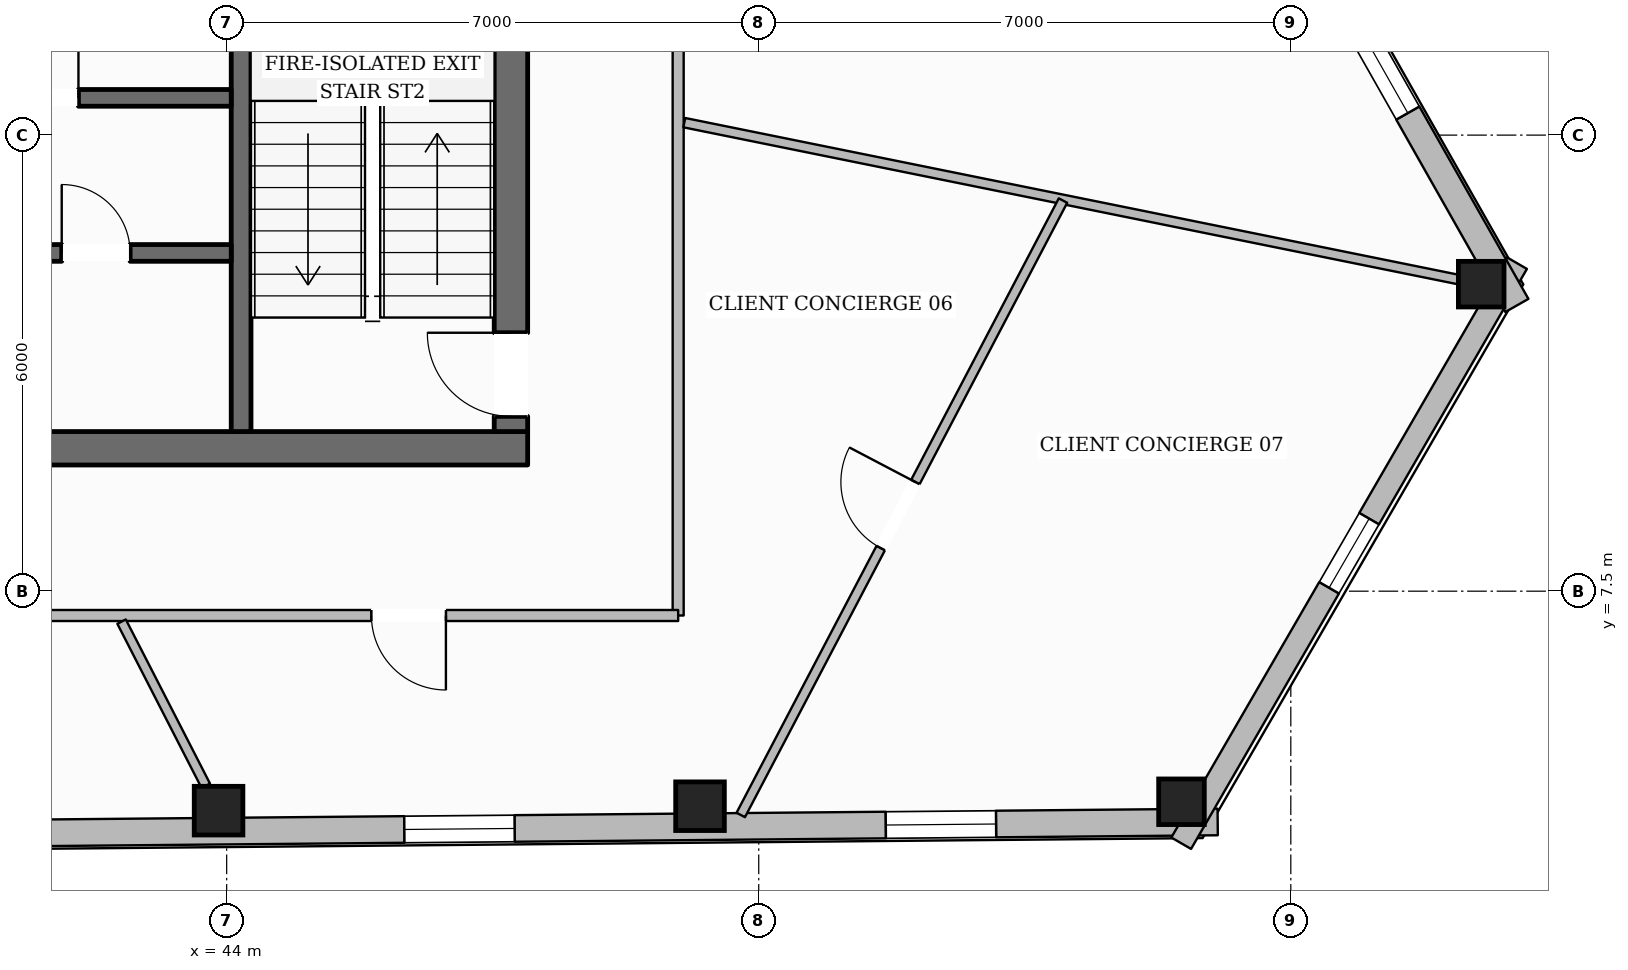
"""IFC4 building model, lengths in metres.
Left out: names, types, materials, properties, quantities, classifications, styles, units other than length and angle.
Written with IfcOpenShell. Run it as: python <this file> out.ifc"""

import sys

from ifc_helpers import new_model, si_unit, direction, frame, frame_2d, origin, origin_2d, place, context, subcontext, project, spatial, rectangle, hollow_rectangle, extrude, element, fill, save


model = new_model("IFC4")
c1 = context("Model", 3, precision=1e-05, world=origin(), true_north=direction((0.0, 1.0)))
c2 = subcontext(c1, "Body", "Model", "MODEL_VIEW")
j1 = project(units=[si_unit("LENGTHUNIT", "METRE"), si_unit("PLANEANGLEUNIT", "RADIAN")], contexts=[c1])
p1 = place(None, origin())
s1 = spatial("IfcSite", under=j1, at=p1, CompositionType="ELEMENT")
p2 = place(p1, origin())
s2 = spatial("IfcBuilding", under=s1, at=p2, CompositionType="ELEMENT")
p3 = place(p2, frame((0.0, 0.0, 222.75)))
s3 = spatial("IfcBuildingStorey", under=s2, at=p3, CompositionType="ELEMENT", Elevation=222.75)
p4 = place(p3, frame((28.04, 9.38, 0.0), z_axis=(0.0, 0.0, 1.0), x_axis=(1.0, 0.0, 0.0)))
e1 = element("IfcWall", 1, at=p4, inside=s3, PredefinedType="SOLIDWALL", context=c2, shape_type="SweptSolid", body=[
    extrude(rectangle(XDim=19.92, YDim=0.44, at=frame_2d((9.96, 0.0))), origin(), (0.0, 0.0, 1.0), 3.6),
])
p5 = place(p4, frame((10.46, 0.0, 0.0)))
e2 = element("IfcOpeningElement", 2, at=p5, cuts=e1, PredefinedType="OPENING", context=c2, shape_type="SweptSolid", body=[
    extrude(rectangle(XDim=1.4, YDim=2.2, at=frame_2d((0.7, 1.1))), frame((0.0, 0.23, 0.0), z_axis=(0.0, -1.0, 0.0), x_axis=(1.0, 0.0, 0.0)), (0.0, 0.0, 1.0), 0.46),
])
p6 = place(p3, frame((47.74, 9.6, 0.0), z_axis=(0.0, 0.0, 1.0), x_axis=(0.0, 1.0, 0.0)))
e3 = element("IfcWall", 3, at=p6, inside=s3, PredefinedType="SOLIDWALL", context=c2, shape_type="SweptSolid", body=[
    extrude(rectangle(XDim=13.0, YDim=0.44, at=frame_2d((6.5, 0.0))), origin(), (0.0, 0.0, 1.0), 3.6),
])
p7 = place(p6, frame((0.2, 0.0, 0.0)))
e4 = element("IfcOpeningElement", 4, at=p7, cuts=e3, PredefinedType="OPENING", context=c2, shape_type="SweptSolid", body=[
    extrude(rectangle(XDim=1.1, YDim=2.15, at=frame_2d((0.55, 1.075))), frame((0.0, 0.23, 0.0), z_axis=(0.0, -1.0, 0.0), x_axis=(1.0, 0.0, 0.0)), (0.0, 0.0, 1.0), 0.46),
])
p8 = place(p6, frame((8.4, 0.0, 0.0)))
e5 = element("IfcOpeningElement", 5, at=p8, cuts=e3, PredefinedType="OPENING", context=c2, shape_type="SweptSolid", body=[
    extrude(rectangle(XDim=0.9, YDim=2.1, at=frame_2d((0.45, 1.05))), frame((0.0, 0.23, 0.0), z_axis=(0.0, -1.0, 0.0), x_axis=(1.0, 0.0, 0.0)), (0.0, 0.0, 1.0), 0.46),
])
p9 = place(p3, frame((44.19, 9.6, 0.0), z_axis=(0.0, 0.0, 1.0), x_axis=(0.0, 1.0, 0.0)))
e6 = element("IfcWall", 6, at=p9, inside=s3, PredefinedType="SHEAR", context=c2, shape_type="SweptSolid", body=[
    extrude(rectangle(XDim=13.0, YDim=0.26, at=frame_2d((6.5, 0.0))), origin(), (0.0, 0.0, 1.0), 3.6),
])
p10 = place(p9, frame((10.925, 0.0, 0.0)))
e7 = element("IfcOpeningElement", 7, at=p10, cuts=e6, PredefinedType="OPENING", context=c2, shape_type="SweptSolid", body=[
    extrude(rectangle(XDim=1.25, YDim=2.25, at=frame_2d((0.625, 1.125))), frame((0.0, 0.14, 0.0), z_axis=(0.0, -1.0, 0.0), x_axis=(1.0, 0.0, 0.0)), (0.0, 0.0, 1.0), 0.28),
])
p11 = place(p3, frame((31.94, 13.99, 0.0), z_axis=(0.0, 0.0, 1.0), x_axis=(1.0, 0.0, 0.0)))
e8 = element("IfcWall", 8, at=p11, inside=s3, PredefinedType="SOLIDWALL", context=c2, shape_type="SweptSolid", body=[
    extrude(rectangle(XDim=12.12, YDim=0.22, at=frame_2d((6.06, 0.0))), origin(), (0.0, 0.0, 1.0), 3.6),
])
p12 = place(p11, frame((3.11, 0.0, 0.0)))
e9 = element("IfcOpeningElement", 9, at=p12, cuts=e8, PredefinedType="OPENING", context=c2, shape_type="SweptSolid", body=[
    extrude(rectangle(XDim=0.9, YDim=2.1, at=frame_2d((0.45, 1.05))), frame((0.0, 0.12, 0.0), z_axis=(0.0, -1.0, 0.0), x_axis=(1.0, 0.0, 0.0)), (0.0, 0.0, 1.0), 0.24),
])
p13 = place(p11, frame((9.21, 0.0, 0.0)))
e10 = element("IfcOpeningElement", 10, at=p13, cuts=e8, PredefinedType="OPENING", context=c2, shape_type="SweptSolid", body=[
    extrude(rectangle(XDim=0.9, YDim=2.1, at=frame_2d((0.45, 1.05))), frame((0.0, 0.12, 0.0), z_axis=(0.0, -1.0, 0.0), x_axis=(1.0, 0.0, 0.0)), (0.0, 0.0, 1.0), 0.24),
])
p14 = place(p3, frame((40.28, 11.95, 0.0), z_axis=(0.0, 0.0, 1.0), x_axis=(1.0, 0.0, 0.0)))
e11 = element("IfcWall", 11, at=p14, inside=s3, PredefinedType="SOLIDWALL", context=c2, shape_type="SweptSolid", body=[
    extrude(rectangle(XDim=3.78, YDim=0.22, at=frame_2d((1.89, 0.0))), origin(), (0.0, 0.0, 1.0), 3.6),
])
p15 = place(p14, frame((1.55, 0.0, 0.0)))
e12 = element("IfcOpeningElement", 12, at=p15, cuts=e11, PredefinedType="OPENING", context=c2, shape_type="SweptSolid", body=[
    extrude(rectangle(XDim=0.9, YDim=2.1, at=frame_2d((0.45, 1.05))), frame((0.0, 0.12, 0.0), z_axis=(0.0, -1.0, 0.0), x_axis=(1.0, 0.0, 0.0)), (0.0, 0.0, 1.0), 0.24),
])
for number, where, z_axis, x_axis in (
    (13, (43.893, 4.613, 0.0), (0.0, 0.0, 1.0), (1.0, 0.0, 0.0)),
    (14, (50.228, 4.671, 0.0), (0.0, 0.0, 1.0), (1.0, 0.0, 0.0)),
):
    element("IfcColumn", number, at=place(p3, frame(where, z_axis=z_axis, x_axis=x_axis)), inside=s3, PredefinedType="COLUMN", context=c2, shape_type="SweptSolid", body=[
        extrude(hollow_rectangle(XDim=0.64, YDim=0.64, WallThickness=0.028, at=origin_2d()), origin(), (0.0, 0.0, 1.0), 3.6),
    ])
for number, where, z_axis, x_axis in (
    (15, (56.562, 4.729, 0.0), (0.0, 0.0, 1.0), (1.0, 0.0, 0.0)),
    (16, (60.505, 11.539, 0.0), (0.0, 0.0, 1.0), (1.0, 0.0, 0.0)),
):
    element("IfcColumn", number, at=place(p3, frame(where, z_axis=z_axis, x_axis=x_axis)), inside=s3, PredefinedType="COLUMN", context=c2, shape_type="SweptSolid", body=[
        extrude(hollow_rectangle(XDim=0.6, YDim=0.6, WallThickness=0.028, at=origin_2d()), origin(), (0.0, 0.0, 1.0), 3.6),
    ])
p16 = place(p3, frame((57.038, 4.464, 0.0), z_axis=(0.0, 0.0, 1.0), x_axis=(-0.999957405044, -0.009229739812, 0.0)))
e17 = element("IfcWall", 17, at=p16, inside=s3, PredefinedType="STANDARD", context=c2, shape_type="SweptSolid", body=[
    extrude(rectangle(XDim=38.963, YDim=0.35, at=frame_2d((19.481, 0.0))), origin(), (0.0, 0.0, 1.0), 3.132),
])
p17 = place(p16, frame((34.588, 0.0, 0.65)))
e18 = element("IfcOpeningElement", 18, at=p17, cuts=e17, PredefinedType="OPENING", context=c2, shape_type="SweptSolid", body=[
    extrude(rectangle(XDim=1.45, YDim=1.75, at=frame_2d((0.725, 0.875))), frame((0.0, 0.185, 0.0), z_axis=(0.0, -1.0, 0.0), x_axis=(1.0, 0.0, 0.0)), (0.0, 0.0, 1.0), 0.37),
])
p18 = place(p16, frame((28.254, 0.0, 0.65)))
e19 = element("IfcOpeningElement", 19, at=p18, cuts=e17, PredefinedType="OPENING", context=c2, shape_type="SweptSolid", body=[
    extrude(rectangle(XDim=1.45, YDim=1.75, at=frame_2d((0.725, 0.875))), frame((0.0, 0.185, 0.0), z_axis=(0.0, -1.0, 0.0), x_axis=(1.0, 0.0, 0.0)), (0.0, 0.0, 1.0), 0.37),
])
p19 = place(p16, frame((21.919, 0.0, 0.65)))
e20 = element("IfcOpeningElement", 20, at=p19, cuts=e17, PredefinedType="OPENING", context=c2, shape_type="SweptSolid", body=[
    extrude(rectangle(XDim=1.45, YDim=1.75, at=frame_2d((0.725, 0.875))), frame((0.0, 0.185, 0.0), z_axis=(0.0, -1.0, 0.0), x_axis=(1.0, 0.0, 0.0)), (0.0, 0.0, 1.0), 0.37),
])
p20 = place(p16, frame((9.25, 0.0, 0.65)))
e21 = element("IfcOpeningElement", 21, at=p20, cuts=e17, PredefinedType="OPENING", context=c2, shape_type="SweptSolid", body=[
    extrude(rectangle(XDim=1.45, YDim=1.75, at=frame_2d((0.725, 0.875))), frame((0.0, 0.185, 0.0), z_axis=(0.0, -1.0, 0.0), x_axis=(1.0, 0.0, 0.0)), (0.0, 0.0, 1.0), 0.37),
])
p21 = place(p16, frame((2.916, 0.0, 0.65)))
e22 = element("IfcOpeningElement", 22, at=p21, cuts=e17, PredefinedType="OPENING", context=c2, shape_type="SweptSolid", body=[
    extrude(rectangle(XDim=1.45, YDim=1.75, at=frame_2d((0.725, 0.875))), frame((0.0, 0.185, 0.0), z_axis=(0.0, -1.0, 0.0), x_axis=(1.0, 0.0, 0.0)), (0.0, 0.0, 1.0), 0.37),
])
p22 = place(p3, frame((60.977, 11.815, 0.0), z_axis=(0.0, 0.0, 1.0), x_axis=(-0.501119216376, -0.865378258901, 0.0)))
e23 = element("IfcWall", 23, at=p22, inside=s3, PredefinedType="STANDARD", context=c2, shape_type="SweptSolid", body=[
    extrude(rectangle(XDim=8.818, YDim=0.3, at=frame_2d((4.409, 0.0))), origin(), (0.0, 0.0, 1.0), 3.132),
])
p23 = place(p22, frame((3.884, 0.0, 0.65)))
e24 = element("IfcOpeningElement", 24, at=p23, cuts=e23, PredefinedType="OPENING", context=c2, shape_type="SweptSolid", body=[
    extrude(rectangle(XDim=1.05, YDim=1.7, at=frame_2d((0.525, 0.85))), frame((0.0, 0.16, 0.0), z_axis=(0.0, -1.0, 0.0), x_axis=(1.0, 0.0, 0.0)), (0.0, 0.0, 1.0), 0.32),
])
p24 = place(p3, frame((41.804, 45.08, 0.0), z_axis=(0.0, 0.0, 1.0), x_axis=(0.493108750239, -0.869967677812, 0.0)))
e25 = element("IfcWall", 25, at=p24, inside=s3, PredefinedType="STANDARD", context=c2, shape_type="SweptSolid", body=[
    extrude(rectangle(XDim=38.876, YDim=0.35, at=frame_2d((19.438, 0.0))), origin(), (0.0, 0.0, 1.0), 3.132),
])
p25 = place(p24, frame((28.557, 0.0, 0.0)))
e26 = element("IfcOpeningElement", 26, at=p25, cuts=e25, PredefinedType="OPENING", context=c2, shape_type="SweptSolid", body=[
    extrude(rectangle(XDim=1.0, YDim=2.2, at=frame_2d((0.5, 1.1))), frame((0.0, 0.185, 0.0), z_axis=(0.0, -1.0, 0.0), x_axis=(1.0, 0.0, 0.0)), (0.0, 0.0, 1.0), 0.37),
])
p26 = place(p24, frame((34.516, 0.0, 0.65)))
e27 = element("IfcOpeningElement", 27, at=p26, cuts=e25, PredefinedType="OPENING", context=c2, shape_type="SweptSolid", body=[
    extrude(rectangle(XDim=1.45, YDim=1.75, at=frame_2d((0.725, 0.875))), frame((0.0, 0.185, 0.0), z_axis=(0.0, -1.0, 0.0), x_axis=(1.0, 0.0, 0.0)), (0.0, 0.0, 1.0), 0.37),
])
p27 = place(p24, frame((21.876, 0.0, 0.65)))
e28 = element("IfcOpeningElement", 28, at=p27, cuts=e25, PredefinedType="OPENING", context=c2, shape_type="SweptSolid", body=[
    extrude(rectangle(XDim=1.45, YDim=1.75, at=frame_2d((0.725, 0.875))), frame((0.0, 0.185, 0.0), z_axis=(0.0, -1.0, 0.0), x_axis=(1.0, 0.0, 0.0)), (0.0, 0.0, 1.0), 0.37),
])
p28 = place(p24, frame((9.237, 0.0, 0.65)))
e29 = element("IfcOpeningElement", 29, at=p28, cuts=e25, PredefinedType="OPENING", context=c2, shape_type="SweptSolid", body=[
    extrude(rectangle(XDim=1.45, YDim=1.75, at=frame_2d((0.725, 0.875))), frame((0.0, 0.185, 0.0), z_axis=(0.0, -1.0, 0.0), x_axis=(1.0, 0.0, 0.0)), (0.0, 0.0, 1.0), 0.37),
])
p29 = place(p24, frame((2.917, 0.0, 0.65)))
e30 = element("IfcOpeningElement", 30, at=p29, cuts=e25, PredefinedType="OPENING", context=c2, shape_type="SweptSolid", body=[
    extrude(rectangle(XDim=1.45, YDim=1.75, at=frame_2d((0.725, 0.875))), frame((0.0, 0.185, 0.0), z_axis=(0.0, -1.0, 0.0), x_axis=(1.0, 0.0, 0.0)), (0.0, 0.0, 1.0), 0.37),
])
p30 = place(p3, frame((49.94, 15.1, 0.0), z_axis=(0.0, 0.0, 1.0), x_axis=(0.0, -1.0, 0.0)))
e31 = element("IfcWall", 31, at=p30, inside=s3, PredefinedType="PARTITIONING", context=c2, shape_type="SweptSolid", body=[
    extrude(rectangle(XDim=7.92, YDim=0.145, at=frame_2d((3.96, 0.0))), origin(), (0.0, 0.0, 1.0), 3.6),
])
p31 = place(p3, frame((49.94, 7.18, 0.0), z_axis=(0.0, 0.0, 1.0), x_axis=(-1.0, 0.0, 0.0)))
e32 = element("IfcWall", 32, at=p31, inside=s3, PredefinedType="PARTITIONING", context=c2, shape_type="SweptSolid", body=[
    extrude(rectangle(XDim=23.88, YDim=0.145, at=frame_2d((11.94, 0.0))), origin(), (0.0, 0.0, 1.0), 3.339),
])
p32 = place(p31, frame((14.157, 0.0, 0.0)))
e33 = element("IfcOpeningElement", 33, at=p32, cuts=e32, PredefinedType="OPENING", context=c2, shape_type="SweptSolid", body=[
    extrude(rectangle(XDim=0.98, YDim=2.15, at=frame_2d((0.49, 1.075))), frame((0.0, 0.083, 0.0), z_axis=(0.0, -1.0, 0.0), x_axis=(1.0, 0.0, 0.0)), (0.0, 0.0, 1.0), 0.165),
])
p33 = place(p31, frame((3.056, 0.0, 0.0)))
e34 = element("IfcOpeningElement", 34, at=p33, cuts=e32, PredefinedType="OPENING", context=c2, shape_type="SweptSolid", body=[
    extrude(rectangle(XDim=0.98, YDim=2.15, at=frame_2d((0.49, 1.075))), frame((0.0, 0.083, 0.0), z_axis=(0.0, -1.0, 0.0), x_axis=(1.0, 0.0, 0.0)), (0.0, 0.0, 1.0), 0.165),
])
p34 = place(p3, frame((42.617, 7.1, 0.0), z_axis=(0.0, 0.0, 1.0), x_axis=(0.456486180098, -0.889730502669, 0.0)))
e35 = element("IfcWall", 35, at=p34, inside=s3, PredefinedType="PARTITIONING", context=c2, shape_type="SweptSolid", body=[
    extrude(rectangle(XDim=2.427, YDim=0.125, at=frame_2d((1.213, 0.0))), origin(), (0.0, 0.0, 1.0), 3.6),
])
p35 = place(p3, frame((50.021, 13.664, 0.0), z_axis=(0.0, 0.0, 1.0), x_axis=(0.980078307182, -0.198611459366, 0.0)))
e36 = element("IfcWall", 36, at=p35, inside=s3, PredefinedType="PARTITIONING", context=c2, shape_type="SweptSolid", body=[
    extrude(rectangle(XDim=10.383, YDim=0.125, at=frame_2d((5.192, 0.0))), origin(), (0.0, 0.0, 1.0), 3.141),
])
p36 = place(p3, frame((50.763, 4.556, 0.0), z_axis=(0.0, 0.0, 1.0), x_axis=(0.464483684419, 0.885581677153, 0.0)))
e37 = element("IfcWall", 37, at=p36, inside=s3, PredefinedType="PARTITIONING", context=c2, shape_type="SweptSolid", body=[
    extrude(rectangle(XDim=9.127, YDim=0.125, at=frame_2d((4.564, 0.0))), origin(), (0.0, 0.0, 1.0), 3.339),
])
p37 = place(p36, frame((3.966, 0.0, 0.0)))
e38 = element("IfcOpeningElement", 38, at=p37, cuts=e37, PredefinedType="OPENING", context=c2, shape_type="SweptSolid", body=[
    extrude(rectangle(XDim=0.98, YDim=2.15, at=frame_2d((0.49, 1.075))), frame((0.0, 0.073, 0.0), z_axis=(0.0, -1.0, 0.0), x_axis=(1.0, 0.0, 0.0)), (0.0, 0.0, 1.0), 0.145),
])
p38 = place(p20, origin())
e39 = element("IfcWindow", 39, at=p38, inside=s3, PartitioningType="SINGLE_PANEL", PredefinedType="WINDOW", context=c2, shape_type="SweptSolid", body=[
    extrude(rectangle(XDim=1.45, YDim=1.75, at=frame_2d((0.725, 0.875))), frame((0.0, 0.03, 0.0), z_axis=(0.0, -1.0, 0.0), x_axis=(1.0, 0.0, 0.0)), (0.0, 0.0, 1.0), 0.06),
])
fill(e21, e39)
p39 = place(p21, origin())
e40 = element("IfcWindow", 40, at=p39, inside=s3, PartitioningType="SINGLE_PANEL", PredefinedType="WINDOW", context=c2, shape_type="SweptSolid", body=[
    extrude(rectangle(XDim=1.45, YDim=1.75, at=frame_2d((0.725, 0.875))), frame((0.0, 0.03, 0.0), z_axis=(0.0, -1.0, 0.0), x_axis=(1.0, 0.0, 0.0)), (0.0, 0.0, 1.0), 0.06),
])
fill(e22, e40)
p40 = place(p26, origin())
e41 = element("IfcWindow", 41, at=p40, inside=s3, PartitioningType="SINGLE_PANEL", PredefinedType="WINDOW", context=c2, shape_type="SweptSolid", body=[
    extrude(rectangle(XDim=1.45, YDim=1.75, at=frame_2d((0.725, 0.875))), frame((0.0, 0.03, 0.0), z_axis=(0.0, -1.0, 0.0), x_axis=(1.0, 0.0, 0.0)), (0.0, 0.0, 1.0), 0.06),
])
fill(e27, e41)
p41 = place(p23, origin())
e42 = element("IfcWindow", 42, at=p41, inside=s3, PartitioningType="SINGLE_PANEL", PredefinedType="WINDOW", context=c2, shape_type="SweptSolid", body=[
    extrude(rectangle(XDim=1.05, YDim=1.7, at=frame_2d((0.525, 0.85))), frame((0.0, 0.03, 0.0), z_axis=(0.0, -1.0, 0.0), x_axis=(1.0, 0.0, 0.0)), (0.0, 0.0, 1.0), 0.06),
])
fill(e24, e42)
p42 = place(p7, origin())
e43 = element("IfcDoor", 43, at=p42, inside=s3, OperationType="SINGLE_SWING_RIGHT", PredefinedType="DOOR", context=c2, shape_type="SweptSolid", body=[
    extrude(rectangle(XDim=1.1, YDim=2.15, at=frame_2d((0.55, 1.075))), frame((0.0, 0.025, 0.0), z_axis=(0.0, -1.0, 0.0), x_axis=(1.0, 0.0, 0.0)), (0.0, 0.0, 1.0), 0.05),
])
fill(e4, e43)
p43 = place(p13, origin())
e44 = element("IfcDoor", 44, at=p43, inside=s3, OperationType="SINGLE_SWING_RIGHT", PredefinedType="DOOR", context=c2, shape_type="SweptSolid", body=[
    extrude(rectangle(XDim=0.9, YDim=2.1, at=frame_2d((0.45, 1.05))), frame((0.0, 0.025, 0.0), z_axis=(0.0, -1.0, 0.0), x_axis=(1.0, 0.0, 0.0)), (0.0, 0.0, 1.0), 0.05),
])
fill(e10, e44)
p44 = place(p15, origin())
e45 = element("IfcDoor", 45, at=p44, inside=s3, OperationType="SINGLE_SWING_LEFT", PredefinedType="DOOR", context=c2, shape_type="SweptSolid", body=[
    extrude(rectangle(XDim=0.9, YDim=2.1, at=frame_2d((0.45, 1.05))), frame((0.0, 0.025, 0.0), z_axis=(0.0, -1.0, 0.0), x_axis=(1.0, 0.0, 0.0)), (0.0, 0.0, 1.0), 0.05),
])
fill(e12, e45)
p45 = place(p33, origin())
e46 = element("IfcDoor", 46, at=p45, inside=s3, OperationType="SINGLE_SWING_LEFT", PredefinedType="DOOR", context=c2, shape_type="SweptSolid", body=[
    extrude(rectangle(XDim=0.98, YDim=2.15, at=frame_2d((0.49, 1.075))), frame((0.0, 0.025, 0.0), z_axis=(0.0, -1.0, 0.0), x_axis=(1.0, 0.0, 0.0)), (0.0, 0.0, 1.0), 0.05),
])
fill(e34, e46)
p46 = place(p37, origin())
e47 = element("IfcDoor", 47, at=p46, inside=s3, OperationType="SINGLE_SWING_RIGHT", PredefinedType="DOOR", context=c2, shape_type="SweptSolid", body=[
    extrude(rectangle(XDim=0.98, YDim=2.15, at=frame_2d((0.49, 1.075))), frame((0.0, 0.025, 0.0), z_axis=(0.0, -1.0, 0.0), x_axis=(1.0, 0.0, 0.0)), (0.0, 0.0, 1.0), 0.05),
])
fill(e38, e47)
save(model, sys.argv[1])
